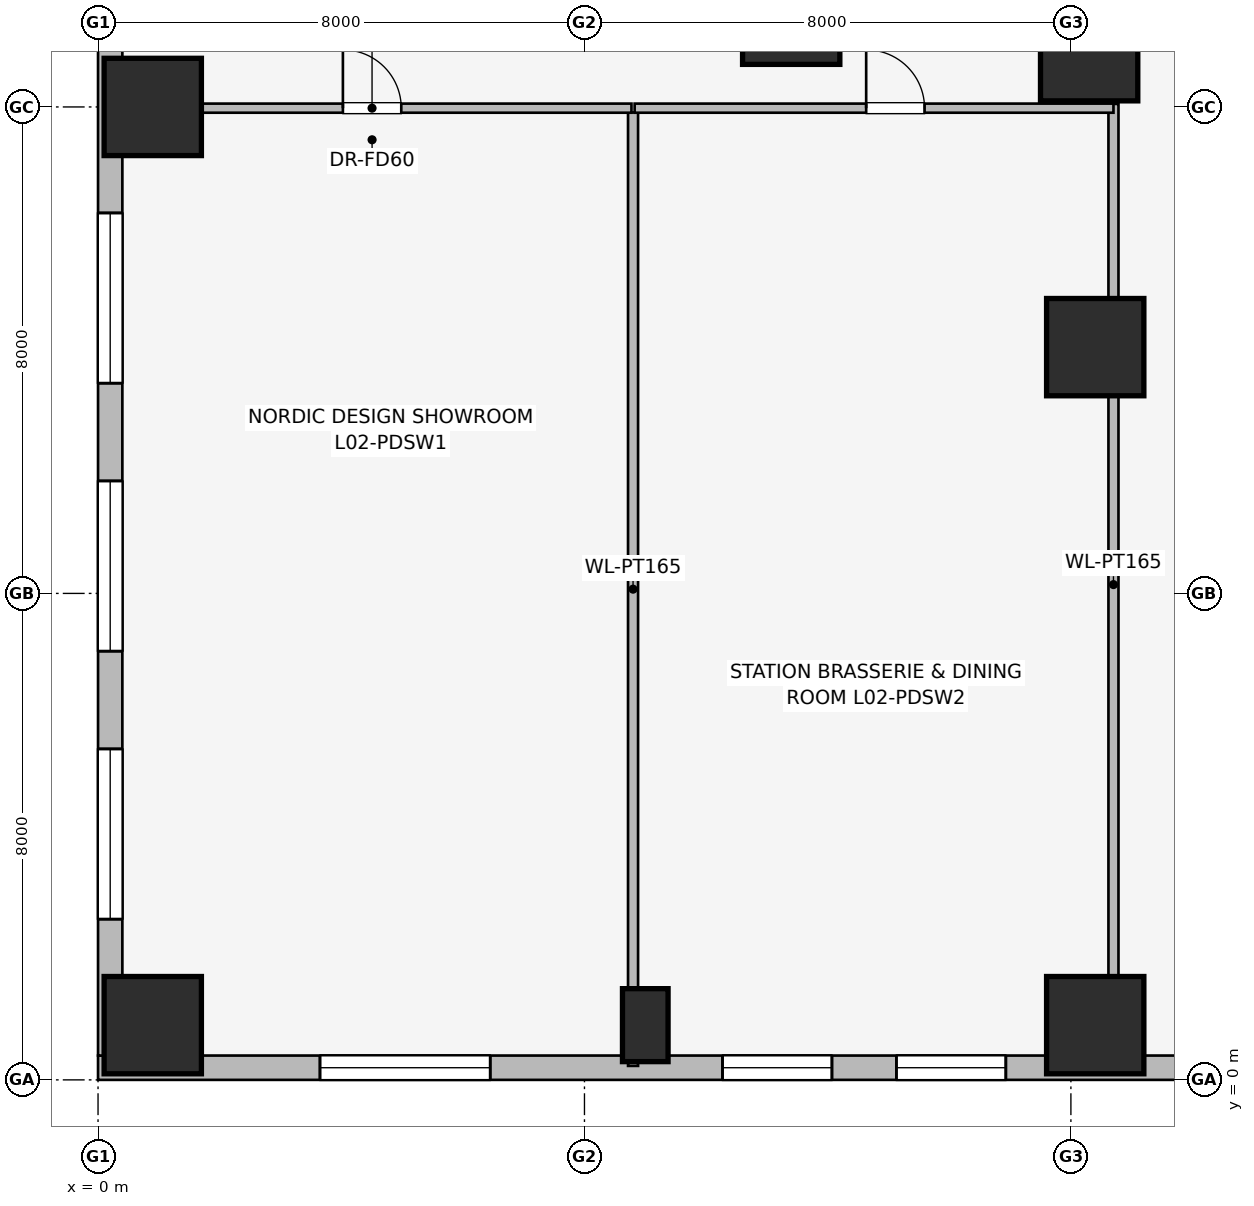
"""IFC4 building model, lengths in metres.
Left out: names, types, materials, properties, quantities, classifications, styles, units other than length and angle.
Written with IfcOpenShell. Run it as: python <this file> out.ifc"""

import sys

from ifc_helpers import new_model, si_unit, direction, frame, frame_2d, origin, origin_2d, place, context, subcontext, project, spatial, rectangle, extrude, element, fill, save


model = new_model("IFC4")
c1 = context("Model", 3, precision=1e-05, world=origin(), true_north=direction((0.0, 1.0)))
c2 = subcontext(c1, "Body", "Model", "MODEL_VIEW")
j1 = project(units=[si_unit("LENGTHUNIT", "METRE"), si_unit("PLANEANGLEUNIT", "RADIAN")], contexts=[c1])
p1 = place(None, origin())
s1 = spatial("IfcSite", under=j1, at=p1, CompositionType="ELEMENT")
p2 = place(p1, origin())
s2 = spatial("IfcBuilding", under=s1, at=p2, CompositionType="ELEMENT")
p3 = place(p2, frame((0.0, 0.0, 6.0)))
s3 = spatial("IfcBuildingStorey", under=s2, at=p3, CompositionType="ELEMENT", Elevation=6.0)
for number, where, z_axis, x_axis in (
    (1, (16.3, 16.9, 0.0), (0.0, 0.0, 1.0), (1.0, 0.0, 0.0)),
    (2, (0.9, 0.9, 0.0), (0.0, 0.0, 1.0), (1.0, 0.0, 0.0)),
    (3, (16.4, 0.9, 0.0), (0.0, 0.0, 1.0), (1.0, 0.0, 0.0)),
    (4, (0.9, 16.0, 0.0), (0.0, 0.0, 1.0), (1.0, 0.0, 0.0)),
    (5, (11.4, 17.5, 0.0), (0.0, 0.0, 1.0), (1.0, 0.0, 0.0)),
    (6, (16.4, 12.05, 0.0), (0.0, 0.0, 1.0), (1.0, 0.0, 0.0)),
):
    element("IfcColumn", number, at=place(p3, frame(where, z_axis=z_axis, x_axis=x_axis)), inside=s3, PredefinedType="COLUMN", context=c2, shape_type="SweptSolid", body=[
        extrude(rectangle(XDim=1.6, YDim=1.6, at=origin_2d()), origin(), (0.0, 0.0, 1.0), 5.0),
    ])
p4 = place(p3, frame((9.0, 0.9, 0.0), z_axis=(0.0, 0.0, 1.0), x_axis=(1.0, 0.0, 0.0)))
e7 = element("IfcColumn", 7, at=p4, inside=s3, PredefinedType="PILASTER", context=c2, shape_type="SweptSolid", body=[
    extrude(rectangle(XDim=0.75, YDim=1.2, at=origin_2d()), origin(), (0.0, 0.0, 1.0), 5.0),
])
p5 = place(p3, frame((26.2, 0.2, 0.0), z_axis=(0.0, 0.0, 1.0), x_axis=(-1.0, 0.0, 0.0)))
e8 = element("IfcWall", 8, at=p5, inside=s3, PredefinedType="STANDARD", context=c2, shape_type="SweptSolid", body=[
    extrude(rectangle(XDim=26.2, YDim=0.4, at=frame_2d((13.1, 0.0))), origin(), (0.0, 0.0, 1.0), 4.69),
])
p6 = place(p5, frame((1.228, 0.0, 0.75)))
e9 = element("IfcOpeningElement", 9, at=p6, cuts=e8, PredefinedType="OPENING", context=c2, shape_type="SweptSolid", body=[
    extrude(rectangle(XDim=2.8, YDim=1.8, at=frame_2d((1.4, 0.9))), frame((0.0, 0.21, 0.0), z_axis=(0.0, -1.0, 0.0), x_axis=(1.0, 0.0, 0.0)), (0.0, 0.0, 1.0), 0.42),
])
p7 = place(p5, frame((5.383, 0.0, 0.75)))
e10 = element("IfcOpeningElement", 10, at=p7, cuts=e8, PredefinedType="OPENING", context=c2, shape_type="SweptSolid", body=[
    extrude(rectangle(XDim=2.8, YDim=1.8, at=frame_2d((1.4, 0.9))), frame((0.0, 0.21, 0.0), z_axis=(0.0, -1.0, 0.0), x_axis=(1.0, 0.0, 0.0)), (0.0, 0.0, 1.0), 0.42),
])
p8 = place(p5, frame((11.27, 0.0, 0.75)))
e11 = element("IfcOpeningElement", 11, at=p8, cuts=e8, PredefinedType="OPENING", context=c2, shape_type="SweptSolid", body=[
    extrude(rectangle(XDim=1.8, YDim=1.5, at=frame_2d((0.9, 0.75))), frame((0.0, 0.21, 0.0), z_axis=(0.0, -1.0, 0.0), x_axis=(1.0, 0.0, 0.0)), (0.0, 0.0, 1.0), 0.42),
])
p9 = place(p5, frame((14.13, 0.0, 0.75)))
e12 = element("IfcOpeningElement", 12, at=p9, cuts=e8, PredefinedType="OPENING", context=c2, shape_type="SweptSolid", body=[
    extrude(rectangle(XDim=1.8, YDim=1.5, at=frame_2d((0.9, 0.75))), frame((0.0, 0.21, 0.0), z_axis=(0.0, -1.0, 0.0), x_axis=(1.0, 0.0, 0.0)), (0.0, 0.0, 1.0), 0.42),
])
p10 = place(p5, frame((19.75, 0.0, 0.75)))
e13 = element("IfcOpeningElement", 13, at=p10, cuts=e8, PredefinedType="OPENING", context=c2, shape_type="SweptSolid", body=[
    extrude(rectangle(XDim=2.8, YDim=1.8, at=frame_2d((1.4, 0.9))), frame((0.0, 0.21, 0.0), z_axis=(0.0, -1.0, 0.0), x_axis=(1.0, 0.0, 0.0)), (0.0, 0.0, 1.0), 0.42),
])
p11 = place(p3, frame((0.2, 0.4, 0.0), z_axis=(0.0, 0.0, 1.0), x_axis=(0.0, 1.0, 0.0)))
e14 = element("IfcWall", 14, at=p11, inside=s3, PredefinedType="STANDARD", context=c2, shape_type="SweptSolid", body=[
    extrude(rectangle(XDim=23.6, YDim=0.4, at=frame_2d((11.8, 0.0))), origin(), (0.0, 0.0, 1.0), 4.69),
])
p12 = place(p11, frame((2.243, 0.0, 0.75)))
e15 = element("IfcOpeningElement", 15, at=p12, cuts=e14, PredefinedType="OPENING", context=c2, shape_type="SweptSolid", body=[
    extrude(rectangle(XDim=2.8, YDim=1.8, at=frame_2d((1.4, 0.9))), frame((0.0, 0.21, 0.0), z_axis=(0.0, -1.0, 0.0), x_axis=(1.0, 0.0, 0.0)), (0.0, 0.0, 1.0), 0.42),
])
p13 = place(p11, frame((6.65, 0.0, 0.75)))
e16 = element("IfcOpeningElement", 16, at=p13, cuts=e14, PredefinedType="OPENING", context=c2, shape_type="SweptSolid", body=[
    extrude(rectangle(XDim=2.8, YDim=1.8, at=frame_2d((1.4, 0.9))), frame((0.0, 0.21, 0.0), z_axis=(0.0, -1.0, 0.0), x_axis=(1.0, 0.0, 0.0)), (0.0, 0.0, 1.0), 0.42),
])
p14 = place(p11, frame((11.057, 0.0, 0.75)))
e17 = element("IfcOpeningElement", 17, at=p14, cuts=e14, PredefinedType="OPENING", context=c2, shape_type="SweptSolid", body=[
    extrude(rectangle(XDim=2.8, YDim=1.8, at=frame_2d((1.4, 0.9))), frame((0.0, 0.21, 0.0), z_axis=(0.0, -1.0, 0.0), x_axis=(1.0, 0.0, 0.0)), (0.0, 0.0, 1.0), 0.42),
])
p15 = place(p11, frame((17.268, 0.0, 0.75)))
e18 = element("IfcOpeningElement", 18, at=p15, cuts=e14, PredefinedType="OPENING", context=c2, shape_type="SweptSolid", body=[
    extrude(rectangle(XDim=1.8, YDim=1.5, at=frame_2d((0.9, 0.75))), frame((0.0, 0.21, 0.0), z_axis=(0.0, -1.0, 0.0), x_axis=(1.0, 0.0, 0.0)), (0.0, 0.0, 1.0), 0.42),
])
p16 = place(p11, frame((20.523, 0.0, 0.75)))
e19 = element("IfcOpeningElement", 19, at=p16, cuts=e14, PredefinedType="OPENING", context=c2, shape_type="SweptSolid", body=[
    extrude(rectangle(XDim=1.8, YDim=1.5, at=frame_2d((0.9, 0.75))), frame((0.0, 0.21, 0.0), z_axis=(0.0, -1.0, 0.0), x_axis=(1.0, 0.0, 0.0)), (0.0, 0.0, 1.0), 0.42),
])
p17 = place(p3, frame((16.7, 0.24, 0.0), z_axis=(0.0, 0.0, 1.0), x_axis=(0.0, 1.0, 0.0)))
e20 = element("IfcWall", 20, at=p17, inside=s3, PredefinedType="PARTITIONING", context=c2, shape_type="SweptSolid", body=[
    extrude(rectangle(XDim=15.81, YDim=0.165, at=frame_2d((7.905, 0.0))), origin(), (0.0, 0.0, 1.0), 3.763),
])
p18 = place(p3, frame((8.799, 0.23, 0.0), z_axis=(0.0, 0.0, 1.0), x_axis=(0.0, 1.0, 0.0)))
e21 = element("IfcWall", 21, at=p18, inside=s3, PredefinedType="PARTITIONING", context=c2, shape_type="SweptSolid", body=[
    extrude(rectangle(XDim=15.68, YDim=0.165, at=frame_2d((7.84, 0.0))), origin(), (0.0, 0.0, 1.0), 4.69),
])
p19 = place(p3, frame((0.24, 15.98, 0.0), z_axis=(0.0, 0.0, 1.0), x_axis=(1.0, 0.0, 0.0)))
e22 = element("IfcWall", 22, at=p19, inside=s3, PredefinedType="PARTITIONING", context=c2, shape_type="SweptSolid", body=[
    extrude(rectangle(XDim=8.533, YDim=0.15, at=frame_2d((4.267, 0.0))), origin(), (0.0, 0.0, 1.0), 3.742),
])
p20 = place(p19, frame((3.787, 0.0, 0.0)))
e23 = element("IfcOpeningElement", 23, at=p20, cuts=e22, PredefinedType="OPENING", context=c2, shape_type="SweptSolid", body=[
    extrude(rectangle(XDim=0.96, YDim=2.0, at=frame_2d((0.48, 1.0))), frame((0.0, 0.085, 0.0), z_axis=(0.0, -1.0, 0.0), x_axis=(1.0, 0.0, 0.0)), (0.0, 0.0, 1.0), 0.17),
])
p21 = place(p3, frame((8.825, 15.98, 0.0), z_axis=(0.0, 0.0, 1.0), x_axis=(1.0, 0.0, 0.0)))
e24 = element("IfcWall", 24, at=p21, inside=s3, PredefinedType="PARTITIONING", context=c2, shape_type="SweptSolid", body=[
    extrude(rectangle(XDim=7.875, YDim=0.15, at=frame_2d((3.938, 0.0))), origin(), (0.0, 0.0, 1.0), 4.69),
])
p22 = place(p21, frame((3.808, 0.0, 0.0)))
e25 = element("IfcOpeningElement", 25, at=p22, cuts=e24, PredefinedType="OPENING", context=c2, shape_type="SweptSolid", body=[
    extrude(rectangle(XDim=0.96, YDim=2.0, at=frame_2d((0.48, 1.0))), frame((0.0, 0.085, 0.0), z_axis=(0.0, -1.0, 0.0), x_axis=(1.0, 0.0, 0.0)), (0.0, 0.0, 1.0), 0.17),
])
p23 = place(p8, origin())
e26 = element("IfcWindow", 26, at=p23, inside=s3, PartitioningType="SINGLE_PANEL", PredefinedType="WINDOW", context=c2, shape_type="SweptSolid", body=[
    extrude(rectangle(XDim=1.8, YDim=1.5, at=frame_2d((0.9, 0.75))), frame((0.0, 0.03, 0.0), z_axis=(0.0, -1.0, 0.0), x_axis=(1.0, 0.0, 0.0)), (0.0, 0.0, 1.0), 0.06),
])
fill(e11, e26)
p24 = place(p9, origin())
e27 = element("IfcWindow", 27, at=p24, inside=s3, PartitioningType="SINGLE_PANEL", PredefinedType="WINDOW", context=c2, shape_type="SweptSolid", body=[
    extrude(rectangle(XDim=1.8, YDim=1.5, at=frame_2d((0.9, 0.75))), frame((0.0, 0.03, 0.0), z_axis=(0.0, -1.0, 0.0), x_axis=(1.0, 0.0, 0.0)), (0.0, 0.0, 1.0), 0.06),
])
fill(e12, e27)
p25 = place(p10, origin())
e28 = element("IfcWindow", 28, at=p25, inside=s3, PartitioningType="SINGLE_PANEL", PredefinedType="WINDOW", context=c2, shape_type="SweptSolid", body=[
    extrude(rectangle(XDim=2.8, YDim=1.8, at=frame_2d((1.4, 0.9))), frame((0.0, 0.03, 0.0), z_axis=(0.0, -1.0, 0.0), x_axis=(1.0, 0.0, 0.0)), (0.0, 0.0, 1.0), 0.06),
])
fill(e13, e28)
p26 = place(p12, origin())
e29 = element("IfcWindow", 29, at=p26, inside=s3, PartitioningType="SINGLE_PANEL", PredefinedType="WINDOW", context=c2, shape_type="SweptSolid", body=[
    extrude(rectangle(XDim=2.8, YDim=1.8, at=frame_2d((1.4, 0.9))), frame((0.0, 0.03, 0.0), z_axis=(0.0, -1.0, 0.0), x_axis=(1.0, 0.0, 0.0)), (0.0, 0.0, 1.0), 0.06),
])
fill(e15, e29)
p27 = place(p13, origin())
e30 = element("IfcWindow", 30, at=p27, inside=s3, PartitioningType="SINGLE_PANEL", PredefinedType="WINDOW", context=c2, shape_type="SweptSolid", body=[
    extrude(rectangle(XDim=2.8, YDim=1.8, at=frame_2d((1.4, 0.9))), frame((0.0, 0.03, 0.0), z_axis=(0.0, -1.0, 0.0), x_axis=(1.0, 0.0, 0.0)), (0.0, 0.0, 1.0), 0.06),
])
fill(e16, e30)
p28 = place(p14, origin())
e31 = element("IfcWindow", 31, at=p28, inside=s3, PartitioningType="SINGLE_PANEL", PredefinedType="WINDOW", context=c2, shape_type="SweptSolid", body=[
    extrude(rectangle(XDim=2.8, YDim=1.8, at=frame_2d((1.4, 0.9))), frame((0.0, 0.03, 0.0), z_axis=(0.0, -1.0, 0.0), x_axis=(1.0, 0.0, 0.0)), (0.0, 0.0, 1.0), 0.06),
])
fill(e17, e31)
p29 = place(p20, origin())
e32 = element("IfcDoor", 32, at=p29, inside=s3, OperationType="SINGLE_SWING_LEFT", PredefinedType="DOOR", context=c2, shape_type="SweptSolid", body=[
    extrude(rectangle(XDim=0.96, YDim=2.0, at=frame_2d((0.48, 1.0))), frame((0.0, 0.025, 0.0), z_axis=(0.0, -1.0, 0.0), x_axis=(1.0, 0.0, 0.0)), (0.0, 0.0, 1.0), 0.05),
])
fill(e23, e32)
p30 = place(p22, origin())
e33 = element("IfcDoor", 33, at=p30, inside=s3, OperationType="SINGLE_SWING_LEFT", PredefinedType="DOOR", context=c2, shape_type="SweptSolid", body=[
    extrude(rectangle(XDim=0.96, YDim=2.0, at=frame_2d((0.48, 1.0))), frame((0.0, 0.025, 0.0), z_axis=(0.0, -1.0, 0.0), x_axis=(1.0, 0.0, 0.0)), (0.0, 0.0, 1.0), 0.05),
])
fill(e25, e33)
save(model, sys.argv[1])
